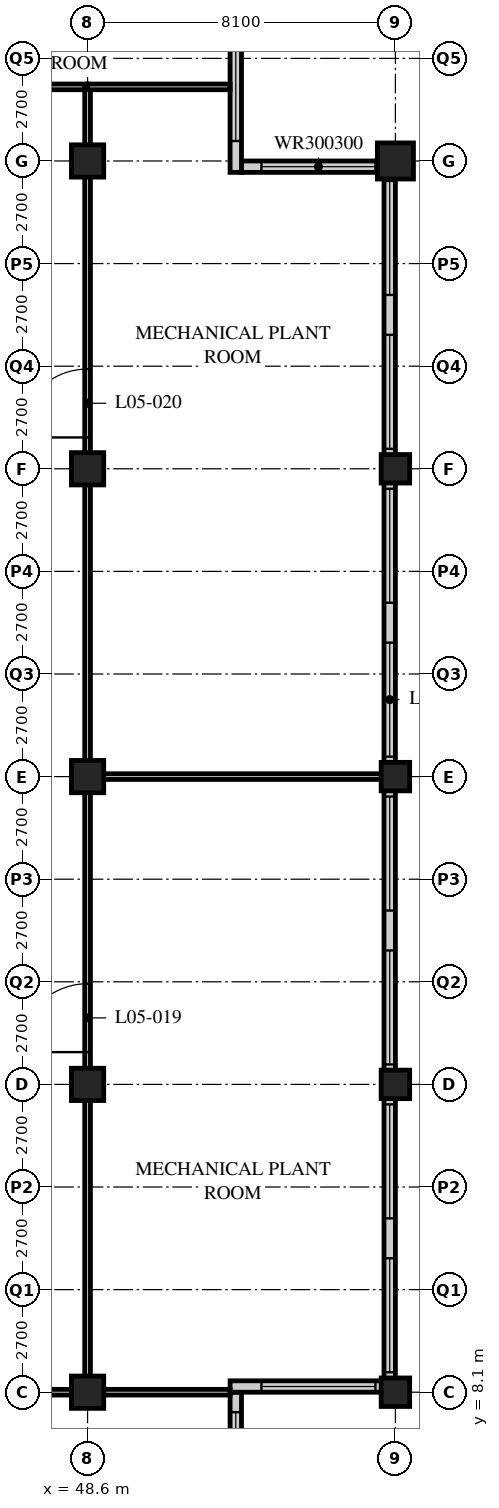
"""IFC4 building model, lengths in metres.
Left out: names, types, materials, properties, quantities, classifications, styles, units other than length and angle.
Written with IfcOpenShell. Run it as: python <this file> out.ifc"""

import sys

from ifc_helpers import new_model, si_unit, direction, frame, frame_2d, origin, origin_2d, place, context, subcontext, project, spatial, rectangle, hollow_rectangle, extrude, element, fill, save


model = new_model("IFC4")
c1 = context("Model", 3, precision=1e-05, world=origin(), true_north=direction((0.0, 1.0)))
c2 = subcontext(c1, "Body", "Model", "MODEL_VIEW")
j1 = project(units=[si_unit("LENGTHUNIT", "METRE"), si_unit("PLANEANGLEUNIT", "RADIAN")], contexts=[c1])
p1 = place(None, origin())
s1 = spatial("IfcSite", under=j1, at=p1, CompositionType="ELEMENT")
p2 = place(p1, origin())
s2 = spatial("IfcBuilding", under=s1, at=p2, CompositionType="ELEMENT")
p3 = place(p2, frame((0.0, 0.0, 27.6)))
s3 = spatial("IfcBuildingStorey", under=s2, at=p3, CompositionType="ELEMENT", Elevation=27.6)
for number, where, z_axis, x_axis in (
    (1, (48.6, 8.1, 0.0), (0.0, 0.0, 1.0), (1.0, 0.0, 0.0)),
    (2, (48.6, 16.2, 0.0), (0.0, 0.0, 1.0), (1.0, 0.0, 0.0)),
    (3, (48.6, 24.3, 0.0), (0.0, 0.0, 1.0), (1.0, 0.0, 0.0)),
    (4, (48.6, 32.4, 0.0), (0.0, 0.0, 1.0), (1.0, 0.0, 0.0)),
    (5, (48.6, 40.5, 0.0), (0.0, 0.0, 1.0), (1.0, 0.0, 0.0)),
):
    element("IfcColumn", number, at=place(p3, frame(where, z_axis=z_axis, x_axis=x_axis)), inside=s3, PredefinedType="COLUMN", context=c2, shape_type="SweptSolid", body=[
        extrude(hollow_rectangle(XDim=0.85, YDim=0.85, WallThickness=0.085, at=origin_2d()), origin(), (0.0, 0.0, 1.0), 5.4),
    ])
for number, where, z_axis, x_axis in (
    (6, (56.7, 8.1, 0.0), (0.0, 0.0, 1.0), (1.0, 0.0, 0.0)),
    (7, (56.7, 16.2, 0.0), (0.0, 0.0, 1.0), (1.0, 0.0, 0.0)),
    (8, (56.7, 24.3, 0.0), (0.0, 0.0, 1.0), (1.0, 0.0, 0.0)),
    (9, (56.7, 32.4, 0.0), (0.0, 0.0, 1.0), (1.0, 0.0, 0.0)),
):
    element("IfcColumn", number, at=place(p3, frame(where, z_axis=z_axis, x_axis=x_axis)), inside=s3, PredefinedType="COLUMN", context=c2, shape_type="SweptSolid", body=[
        extrude(hollow_rectangle(XDim=0.75, YDim=0.75, WallThickness=0.07, at=origin_2d()), origin(), (0.0, 0.0, 1.0), 5.4),
    ])
p4 = place(p3, frame((56.7, 40.5, 0.0), z_axis=(0.0, 0.0, 1.0), x_axis=(1.0, 0.0, 0.0)))
e10 = element("IfcColumn", 10, at=p4, inside=s3, PredefinedType="COLUMN", context=c2, shape_type="SweptSolid", body=[
    extrude(hollow_rectangle(XDim=0.95, YDim=0.95, WallThickness=0.1, at=origin_2d()), origin(), (0.0, 0.0, 1.0), 5.4),
])
p5 = place(p3, frame((52.5, 4.35, 0.0), z_axis=(0.0, 0.0, 1.0), x_axis=(0.0, 1.0, 0.0)))
e11 = element("IfcWall", 11, at=p5, inside=s3, PredefinedType="SOLIDWALL", context=c2, shape_type="SweptSolid", body=[
    extrude(rectangle(XDim=3.75, YDim=0.3, at=frame_2d((1.875, 0.0))), origin(), (0.0, 0.0, 1.0), 5.19),
])
p6 = place(p5, frame((0.225, 0.0, 0.9)))
e12 = element("IfcOpeningElement", 12, at=p6, cuts=e11, PredefinedType="OPENING", context=c2, shape_type="SweptSolid", body=[
    extrude(rectangle(XDim=3.0, YDim=3.0, at=frame_2d((1.5, 1.5))), frame((0.0, 0.16, 0.0), z_axis=(0.0, -1.0, 0.0), x_axis=(1.0, 0.0, 0.0)), (0.0, 0.0, 1.0), 0.32),
])
p7 = place(p3, frame((52.35, 8.25, 0.0), z_axis=(0.0, 0.0, 1.0), x_axis=(1.0, 0.0, 0.0)))
e13 = element("IfcWall", 13, at=p7, inside=s3, PredefinedType="SOLIDWALL", context=c2, shape_type="SweptSolid", body=[
    extrude(rectangle(XDim=4.35, YDim=0.3, at=frame_2d((2.175, 0.0))), origin(), (0.0, 0.0, 1.0), 5.19),
])
p8 = place(p7, frame((0.825, 0.0, 0.9)))
e14 = element("IfcOpeningElement", 14, at=p8, cuts=e13, PredefinedType="OPENING", context=c2, shape_type="SweptSolid", body=[
    extrude(rectangle(XDim=3.0, YDim=3.0, at=frame_2d((1.5, 1.5))), frame((0.0, 0.16, 0.0), z_axis=(0.0, -1.0, 0.0), x_axis=(1.0, 0.0, 0.0)), (0.0, 0.0, 1.0), 0.32),
])
p9 = place(p3, frame((56.55, 8.4, 0.0), z_axis=(0.0, 0.0, 1.0), x_axis=(0.0, 1.0, 0.0)))
e15 = element("IfcWall", 15, at=p9, inside=s3, PredefinedType="SOLIDWALL", context=c2, shape_type="SweptSolid", body=[
    extrude(rectangle(XDim=32.1, YDim=0.3, at=frame_2d((16.05, 0.0))), origin(), (0.0, 0.0, 1.0), 5.19),
])
p10 = place(p9, frame((0.225, 0.0, 0.9)))
e16 = element("IfcOpeningElement", 16, at=p10, cuts=e15, PredefinedType="OPENING", context=c2, shape_type="SweptSolid", body=[
    extrude(rectangle(XDim=3.0, YDim=3.0, at=frame_2d((1.5, 1.5))), frame((0.0, 0.16, 0.0), z_axis=(0.0, -1.0, 0.0), x_axis=(1.0, 0.0, 0.0)), (0.0, 0.0, 1.0), 0.32),
])
p11 = place(p9, frame((4.275, 0.0, 0.9)))
e17 = element("IfcOpeningElement", 17, at=p11, cuts=e15, PredefinedType="OPENING", context=c2, shape_type="SweptSolid", body=[
    extrude(rectangle(XDim=3.0, YDim=3.0, at=frame_2d((1.5, 1.5))), frame((0.0, 0.16, 0.0), z_axis=(0.0, -1.0, 0.0), x_axis=(1.0, 0.0, 0.0)), (0.0, 0.0, 1.0), 0.32),
])
p12 = place(p9, frame((8.325, 0.0, 0.9)))
e18 = element("IfcOpeningElement", 18, at=p12, cuts=e15, PredefinedType="OPENING", context=c2, shape_type="SweptSolid", body=[
    extrude(rectangle(XDim=3.0, YDim=3.0, at=frame_2d((1.5, 1.5))), frame((0.0, 0.16, 0.0), z_axis=(0.0, -1.0, 0.0), x_axis=(1.0, 0.0, 0.0)), (0.0, 0.0, 1.0), 0.32),
])
p13 = place(p9, frame((12.375, 0.0, 0.9)))
e19 = element("IfcOpeningElement", 19, at=p13, cuts=e15, PredefinedType="OPENING", context=c2, shape_type="SweptSolid", body=[
    extrude(rectangle(XDim=3.0, YDim=3.0, at=frame_2d((1.5, 1.5))), frame((0.0, 0.16, 0.0), z_axis=(0.0, -1.0, 0.0), x_axis=(1.0, 0.0, 0.0)), (0.0, 0.0, 1.0), 0.32),
])
p14 = place(p9, frame((16.425, 0.0, 0.9)))
e20 = element("IfcOpeningElement", 20, at=p14, cuts=e15, PredefinedType="OPENING", context=c2, shape_type="SweptSolid", body=[
    extrude(rectangle(XDim=3.0, YDim=3.0, at=frame_2d((1.5, 1.5))), frame((0.0, 0.16, 0.0), z_axis=(0.0, -1.0, 0.0), x_axis=(1.0, 0.0, 0.0)), (0.0, 0.0, 1.0), 0.32),
])
p15 = place(p9, frame((20.475, 0.0, 0.9)))
e21 = element("IfcOpeningElement", 21, at=p15, cuts=e15, PredefinedType="OPENING", context=c2, shape_type="SweptSolid", body=[
    extrude(rectangle(XDim=3.0, YDim=3.0, at=frame_2d((1.5, 1.5))), frame((0.0, 0.16, 0.0), z_axis=(0.0, -1.0, 0.0), x_axis=(1.0, 0.0, 0.0)), (0.0, 0.0, 1.0), 0.32),
])
p16 = place(p9, frame((24.525, 0.0, 0.9)))
e22 = element("IfcOpeningElement", 22, at=p16, cuts=e15, PredefinedType="OPENING", context=c2, shape_type="SweptSolid", body=[
    extrude(rectangle(XDim=3.0, YDim=3.0, at=frame_2d((1.5, 1.5))), frame((0.0, 0.16, 0.0), z_axis=(0.0, -1.0, 0.0), x_axis=(1.0, 0.0, 0.0)), (0.0, 0.0, 1.0), 0.32),
])
p17 = place(p9, frame((28.575, 0.0, 0.9)))
e23 = element("IfcOpeningElement", 23, at=p17, cuts=e15, PredefinedType="OPENING", context=c2, shape_type="SweptSolid", body=[
    extrude(rectangle(XDim=3.0, YDim=3.0, at=frame_2d((1.5, 1.5))), frame((0.0, 0.16, 0.0), z_axis=(0.0, -1.0, 0.0), x_axis=(1.0, 0.0, 0.0)), (0.0, 0.0, 1.0), 0.32),
])
p18 = place(p3, frame((56.4, 40.35, 0.0), z_axis=(0.0, 0.0, 1.0), x_axis=(-1.0, 0.0, 0.0)))
e24 = element("IfcWall", 24, at=p18, inside=s3, PredefinedType="SOLIDWALL", context=c2, shape_type="SweptSolid", body=[
    extrude(rectangle(XDim=3.75, YDim=0.3, at=frame_2d((1.875, 0.0))), origin(), (0.0, 0.0, 1.0), 5.19),
])
p19 = place(p18, frame((0.225, 0.0, 0.9)))
e25 = element("IfcOpeningElement", 25, at=p19, cuts=e24, PredefinedType="OPENING", context=c2, shape_type="SweptSolid", body=[
    extrude(rectangle(XDim=3.0, YDim=3.0, at=frame_2d((1.5, 1.5))), frame((0.0, 0.16, 0.0), z_axis=(0.0, -1.0, 0.0), x_axis=(1.0, 0.0, 0.0)), (0.0, 0.0, 1.0), 0.32),
])
p20 = place(p3, frame((52.5, 40.2, 0.0), z_axis=(0.0, 0.0, 1.0), x_axis=(0.0, 1.0, 0.0)))
e26 = element("IfcWall", 26, at=p20, inside=s3, PredefinedType="SOLIDWALL", context=c2, shape_type="SweptSolid", body=[
    extrude(rectangle(XDim=4.35, YDim=0.3, at=frame_2d((2.175, 0.0))), origin(), (0.0, 0.0, 1.0), 5.19),
])
p21 = place(p20, frame((0.825, 0.0, 0.9)))
e27 = element("IfcOpeningElement", 27, at=p21, cuts=e26, PredefinedType="OPENING", context=c2, shape_type="SweptSolid", body=[
    extrude(rectangle(XDim=3.0, YDim=3.0, at=frame_2d((1.5, 1.5))), frame((0.0, 0.16, 0.0), z_axis=(0.0, -1.0, 0.0), x_axis=(1.0, 0.0, 0.0)), (0.0, 0.0, 1.0), 0.32),
])
p22 = place(p3, frame((8.1, 8.1, 0.0), z_axis=(0.0, 0.0, 1.0), x_axis=(1.0, 0.0, 0.0)))
e28 = element("IfcWall", 28, at=p22, inside=s3, PredefinedType="PARTITIONING", context=c2, shape_type="SweptSolid", body=[
    extrude(rectangle(XDim=40.5, YDim=0.15, at=frame_2d((20.25, 0.0))), origin(), (0.0, 0.0, 1.0), 4.578),
])
p23 = place(p22, frame((11.25, 0.0, 0.0)))
e29 = element("IfcOpeningElement", 29, at=p23, cuts=e28, PredefinedType="OPENING", context=c2, shape_type="SweptSolid", body=[
    extrude(rectangle(XDim=1.8, YDim=2.4, at=frame_2d((0.9, 1.2))), frame((0.0, 0.085, 0.0), z_axis=(0.0, -1.0, 0.0), x_axis=(1.0, 0.0, 0.0)), (0.0, 0.0, 1.0), 0.17),
])
p24 = place(p22, frame((27.45, 0.0, 0.0)))
e30 = element("IfcOpeningElement", 30, at=p24, cuts=e28, PredefinedType="OPENING", context=c2, shape_type="SweptSolid", body=[
    extrude(rectangle(XDim=1.8, YDim=2.4, at=frame_2d((0.9, 1.2))), frame((0.0, 0.085, 0.0), z_axis=(0.0, -1.0, 0.0), x_axis=(1.0, 0.0, 0.0)), (0.0, 0.0, 1.0), 0.17),
])
p25 = place(p22, frame((1.525, 0.0, 0.0)))
e31 = element("IfcOpeningElement", 31, at=p25, cuts=e28, PredefinedType="OPENING", context=c2, shape_type="SweptSolid", body=[
    extrude(rectangle(XDim=1.0, YDim=2.1, at=frame_2d((0.5, 1.05))), frame((0.0, 0.085, 0.0), z_axis=(0.0, -1.0, 0.0), x_axis=(1.0, 0.0, 0.0)), (0.0, 0.0, 1.0), 0.17),
])
p26 = place(p22, frame((37.975, 0.0, 0.0)))
e32 = element("IfcOpeningElement", 32, at=p26, cuts=e28, PredefinedType="OPENING", context=c2, shape_type="SweptSolid", body=[
    extrude(rectangle(XDim=1.0, YDim=2.1, at=frame_2d((0.5, 1.05))), frame((0.0, 0.085, 0.0), z_axis=(0.0, -1.0, 0.0), x_axis=(1.0, 0.0, 0.0)), (0.0, 0.0, 1.0), 0.17),
])
p27 = place(p3, frame((8.1, 42.45, 0.0), z_axis=(0.0, 0.0, 1.0), x_axis=(1.0, 0.0, 0.0)))
e33 = element("IfcWall", 33, at=p27, inside=s3, PredefinedType="PARTITIONING", context=c2, shape_type="SweptSolid", body=[
    extrude(rectangle(XDim=40.5, YDim=0.15, at=frame_2d((20.25, 0.0))), origin(), (0.0, 0.0, 1.0), 5.19),
])
p28 = place(p27, frame((8.2, 0.0, 0.0)))
e34 = element("IfcOpeningElement", 34, at=p28, cuts=e33, PredefinedType="OPENING", context=c2, shape_type="SweptSolid", body=[
    extrude(rectangle(XDim=1.8, YDim=2.4, at=frame_2d((0.9, 1.2))), frame((0.0, 0.085, 0.0), z_axis=(0.0, -1.0, 0.0), x_axis=(1.0, 0.0, 0.0)), (0.0, 0.0, 1.0), 0.17),
])
p29 = place(p27, frame((19.35, 0.0, 0.0)))
e35 = element("IfcOpeningElement", 35, at=p29, cuts=e33, PredefinedType="OPENING", context=c2, shape_type="SweptSolid", body=[
    extrude(rectangle(XDim=1.8, YDim=2.4, at=frame_2d((0.9, 1.2))), frame((0.0, 0.085, 0.0), z_axis=(0.0, -1.0, 0.0), x_axis=(1.0, 0.0, 0.0)), (0.0, 0.0, 1.0), 0.17),
])
p30 = place(p27, frame((32.5, 0.0, 0.0)))
e36 = element("IfcOpeningElement", 36, at=p30, cuts=e33, PredefinedType="OPENING", context=c2, shape_type="SweptSolid", body=[
    extrude(rectangle(XDim=1.8, YDim=2.4, at=frame_2d((0.9, 1.2))), frame((0.0, 0.085, 0.0), z_axis=(0.0, -1.0, 0.0), x_axis=(1.0, 0.0, 0.0)), (0.0, 0.0, 1.0), 0.17),
])
p31 = place(p27, frame((37.975, 0.0, 0.0)))
e37 = element("IfcOpeningElement", 37, at=p31, cuts=e33, PredefinedType="OPENING", context=c2, shape_type="SweptSolid", body=[
    extrude(rectangle(XDim=1.0, YDim=2.1, at=frame_2d((0.5, 1.05))), frame((0.0, 0.085, 0.0), z_axis=(0.0, -1.0, 0.0), x_axis=(1.0, 0.0, 0.0)), (0.0, 0.0, 1.0), 0.17),
])
p32 = place(p27, frame((1.525, 0.0, 0.0)))
e38 = element("IfcOpeningElement", 38, at=p32, cuts=e33, PredefinedType="OPENING", context=c2, shape_type="SweptSolid", body=[
    extrude(rectangle(XDim=1.0, YDim=2.1, at=frame_2d((0.5, 1.05))), frame((0.0, 0.085, 0.0), z_axis=(0.0, -1.0, 0.0), x_axis=(1.0, 0.0, 0.0)), (0.0, 0.0, 1.0), 0.17),
])
p33 = place(p3, frame((48.6, 8.1, 0.0), z_axis=(0.0, 0.0, 1.0), x_axis=(0.0, 1.0, 0.0)))
e39 = element("IfcWall", 39, at=p33, inside=s3, PredefinedType="PARTITIONING", context=c2, shape_type="SweptSolid", body=[
    extrude(rectangle(XDim=34.35, YDim=0.15, at=frame_2d((17.175, 0.0))), origin(), (0.0, 0.0, 1.0), 4.578),
])
p34 = place(p33, frame((8.95, 0.0, 0.0)))
e40 = element("IfcOpeningElement", 40, at=p34, cuts=e39, PredefinedType="OPENING", context=c2, shape_type="SweptSolid", body=[
    extrude(rectangle(XDim=1.8, YDim=2.4, at=frame_2d((0.9, 1.2))), frame((0.0, 0.085, 0.0), z_axis=(0.0, -1.0, 0.0), x_axis=(1.0, 0.0, 0.0)), (0.0, 0.0, 1.0), 0.17),
])
p35 = place(p33, frame((25.125, 0.0, 0.0)))
e41 = element("IfcOpeningElement", 41, at=p35, cuts=e39, PredefinedType="OPENING", context=c2, shape_type="SweptSolid", body=[
    extrude(rectangle(XDim=1.8, YDim=2.4, at=frame_2d((0.9, 1.2))), frame((0.0, 0.085, 0.0), z_axis=(0.0, -1.0, 0.0), x_axis=(1.0, 0.0, 0.0)), (0.0, 0.0, 1.0), 0.17),
])
p36 = place(p3, frame((48.6, 24.3, 0.0), z_axis=(0.0, 0.0, 1.0), x_axis=(1.0, 0.0, 0.0)))
e42 = element("IfcWall", 42, at=p36, inside=s3, PredefinedType="PARTITIONING", context=c2, shape_type="SweptSolid", body=[
    extrude(rectangle(XDim=7.8, YDim=0.15, at=frame_2d((3.9, 0.0))), origin(), (0.0, 0.0, 1.0), 4.578),
])
p37 = place(p3, frame((48.6, 8.1, 0.0), z_axis=(0.0, 0.0, 1.0), x_axis=(1.0, 0.0, 0.0)))
e43 = element("IfcWall", 43, at=p37, inside=s3, PredefinedType="PARTITIONING", context=c2, shape_type="SweptSolid", body=[
    extrude(rectangle(XDim=3.75, YDim=0.15, at=frame_2d((1.875, 0.0))), origin(), (0.0, 0.0, 1.0), 4.578),
])
p38 = place(p3, frame((48.6, 42.45, 0.0), z_axis=(0.0, 0.0, 1.0), x_axis=(1.0, 0.0, 0.0)))
e44 = element("IfcWall", 44, at=p38, inside=s3, PredefinedType="PARTITIONING", context=c2, shape_type="SweptSolid", body=[
    extrude(rectangle(XDim=3.75, YDim=0.15, at=frame_2d((1.875, 0.0))), origin(), (0.0, 0.0, 1.0), 5.19),
])
p39 = place(p6, origin())
e45 = element("IfcWindow", 45, at=p39, inside=s3, PartitioningType="SINGLE_PANEL", PredefinedType="WINDOW", context=c2, shape_type="SweptSolid", body=[
    extrude(rectangle(XDim=3.0, YDim=3.0, at=frame_2d((1.5, 1.5))), frame((0.0, 0.03, 0.0), z_axis=(0.0, -1.0, 0.0), x_axis=(1.0, 0.0, 0.0)), (0.0, 0.0, 1.0), 0.06),
])
fill(e12, e45)
p40 = place(p8, origin())
e46 = element("IfcWindow", 46, at=p40, inside=s3, PartitioningType="SINGLE_PANEL", PredefinedType="WINDOW", context=c2, shape_type="SweptSolid", body=[
    extrude(rectangle(XDim=3.0, YDim=3.0, at=frame_2d((1.5, 1.5))), frame((0.0, 0.03, 0.0), z_axis=(0.0, -1.0, 0.0), x_axis=(1.0, 0.0, 0.0)), (0.0, 0.0, 1.0), 0.06),
])
fill(e14, e46)
p41 = place(p10, origin())
e47 = element("IfcWindow", 47, at=p41, inside=s3, PartitioningType="SINGLE_PANEL", PredefinedType="USERDEFINED", context=c2, shape_type="SweptSolid", body=[
    extrude(rectangle(XDim=3.0, YDim=3.0, at=frame_2d((1.5, 1.5))), frame((0.0, 0.075, 0.0), z_axis=(0.0, -1.0, 0.0), x_axis=(1.0, 0.0, 0.0)), (0.0, 0.0, 1.0), 0.15),
])
fill(e16, e47)
p42 = place(p11, origin())
e48 = element("IfcWindow", 48, at=p42, inside=s3, PartitioningType="SINGLE_PANEL", PredefinedType="USERDEFINED", context=c2, shape_type="SweptSolid", body=[
    extrude(rectangle(XDim=3.0, YDim=3.0, at=frame_2d((1.5, 1.5))), frame((0.0, 0.075, 0.0), z_axis=(0.0, -1.0, 0.0), x_axis=(1.0, 0.0, 0.0)), (0.0, 0.0, 1.0), 0.15),
])
fill(e17, e48)
p43 = place(p12, origin())
e49 = element("IfcWindow", 49, at=p43, inside=s3, PartitioningType="SINGLE_PANEL", PredefinedType="USERDEFINED", context=c2, shape_type="SweptSolid", body=[
    extrude(rectangle(XDim=3.0, YDim=3.0, at=frame_2d((1.5, 1.5))), frame((0.0, 0.075, 0.0), z_axis=(0.0, -1.0, 0.0), x_axis=(1.0, 0.0, 0.0)), (0.0, 0.0, 1.0), 0.15),
])
fill(e18, e49)
p44 = place(p13, origin())
e50 = element("IfcWindow", 50, at=p44, inside=s3, PartitioningType="SINGLE_PANEL", PredefinedType="USERDEFINED", context=c2, shape_type="SweptSolid", body=[
    extrude(rectangle(XDim=3.0, YDim=3.0, at=frame_2d((1.5, 1.5))), frame((0.0, 0.075, 0.0), z_axis=(0.0, -1.0, 0.0), x_axis=(1.0, 0.0, 0.0)), (0.0, 0.0, 1.0), 0.15),
])
fill(e19, e50)
p45 = place(p14, origin())
e51 = element("IfcWindow", 51, at=p45, inside=s3, PartitioningType="SINGLE_PANEL", PredefinedType="USERDEFINED", context=c2, shape_type="SweptSolid", body=[
    extrude(rectangle(XDim=3.0, YDim=3.0, at=frame_2d((1.5, 1.5))), frame((0.0, 0.075, 0.0), z_axis=(0.0, -1.0, 0.0), x_axis=(1.0, 0.0, 0.0)), (0.0, 0.0, 1.0), 0.15),
])
fill(e20, e51)
p46 = place(p15, origin())
e52 = element("IfcWindow", 52, at=p46, inside=s3, PartitioningType="SINGLE_PANEL", PredefinedType="USERDEFINED", context=c2, shape_type="SweptSolid", body=[
    extrude(rectangle(XDim=3.0, YDim=3.0, at=frame_2d((1.5, 1.5))), frame((0.0, 0.075, 0.0), z_axis=(0.0, -1.0, 0.0), x_axis=(1.0, 0.0, 0.0)), (0.0, 0.0, 1.0), 0.15),
])
fill(e21, e52)
p47 = place(p16, origin())
e53 = element("IfcWindow", 53, at=p47, inside=s3, PartitioningType="SINGLE_PANEL", PredefinedType="USERDEFINED", context=c2, shape_type="SweptSolid", body=[
    extrude(rectangle(XDim=3.0, YDim=3.0, at=frame_2d((1.5, 1.5))), frame((0.0, 0.075, 0.0), z_axis=(0.0, -1.0, 0.0), x_axis=(1.0, 0.0, 0.0)), (0.0, 0.0, 1.0), 0.15),
])
fill(e22, e53)
p48 = place(p17, origin())
e54 = element("IfcWindow", 54, at=p48, inside=s3, PartitioningType="SINGLE_PANEL", PredefinedType="USERDEFINED", context=c2, shape_type="SweptSolid", body=[
    extrude(rectangle(XDim=3.0, YDim=3.0, at=frame_2d((1.5, 1.5))), frame((0.0, 0.075, 0.0), z_axis=(0.0, -1.0, 0.0), x_axis=(1.0, 0.0, 0.0)), (0.0, 0.0, 1.0), 0.15),
])
fill(e23, e54)
p49 = place(p19, origin())
e55 = element("IfcWindow", 55, at=p49, inside=s3, PartitioningType="SINGLE_PANEL", PredefinedType="WINDOW", context=c2, shape_type="SweptSolid", body=[
    extrude(rectangle(XDim=3.0, YDim=3.0, at=frame_2d((1.5, 1.5))), frame((0.0, 0.03, 0.0), z_axis=(0.0, -1.0, 0.0), x_axis=(1.0, 0.0, 0.0)), (0.0, 0.0, 1.0), 0.06),
])
fill(e25, e55)
p50 = place(p21, origin())
e56 = element("IfcWindow", 56, at=p50, inside=s3, PartitioningType="SINGLE_PANEL", PredefinedType="WINDOW", context=c2, shape_type="SweptSolid", body=[
    extrude(rectangle(XDim=3.0, YDim=3.0, at=frame_2d((1.5, 1.5))), frame((0.0, 0.03, 0.0), z_axis=(0.0, -1.0, 0.0), x_axis=(1.0, 0.0, 0.0)), (0.0, 0.0, 1.0), 0.06),
])
fill(e27, e56)
p51 = place(p34, origin())
e57 = element("IfcDoor", 57, at=p51, inside=s3, OperationType="DOUBLE_DOOR_SINGLE_SWING", PredefinedType="DOOR", context=c2, shape_type="SweptSolid", body=[
    extrude(rectangle(XDim=1.8, YDim=2.4, at=frame_2d((0.9, 1.2))), frame((0.0, 0.025, 0.0), z_axis=(0.0, -1.0, 0.0), x_axis=(1.0, 0.0, 0.0)), (0.0, 0.0, 1.0), 0.05),
])
fill(e40, e57)
p52 = place(p35, origin())
e58 = element("IfcDoor", 58, at=p52, inside=s3, OperationType="DOUBLE_DOOR_SINGLE_SWING", PredefinedType="DOOR", context=c2, shape_type="SweptSolid", body=[
    extrude(rectangle(XDim=1.8, YDim=2.4, at=frame_2d((0.9, 1.2))), frame((0.0, 0.025, 0.0), z_axis=(0.0, -1.0, 0.0), x_axis=(1.0, 0.0, 0.0)), (0.0, 0.0, 1.0), 0.05),
])
fill(e41, e58)
save(model, sys.argv[1])
